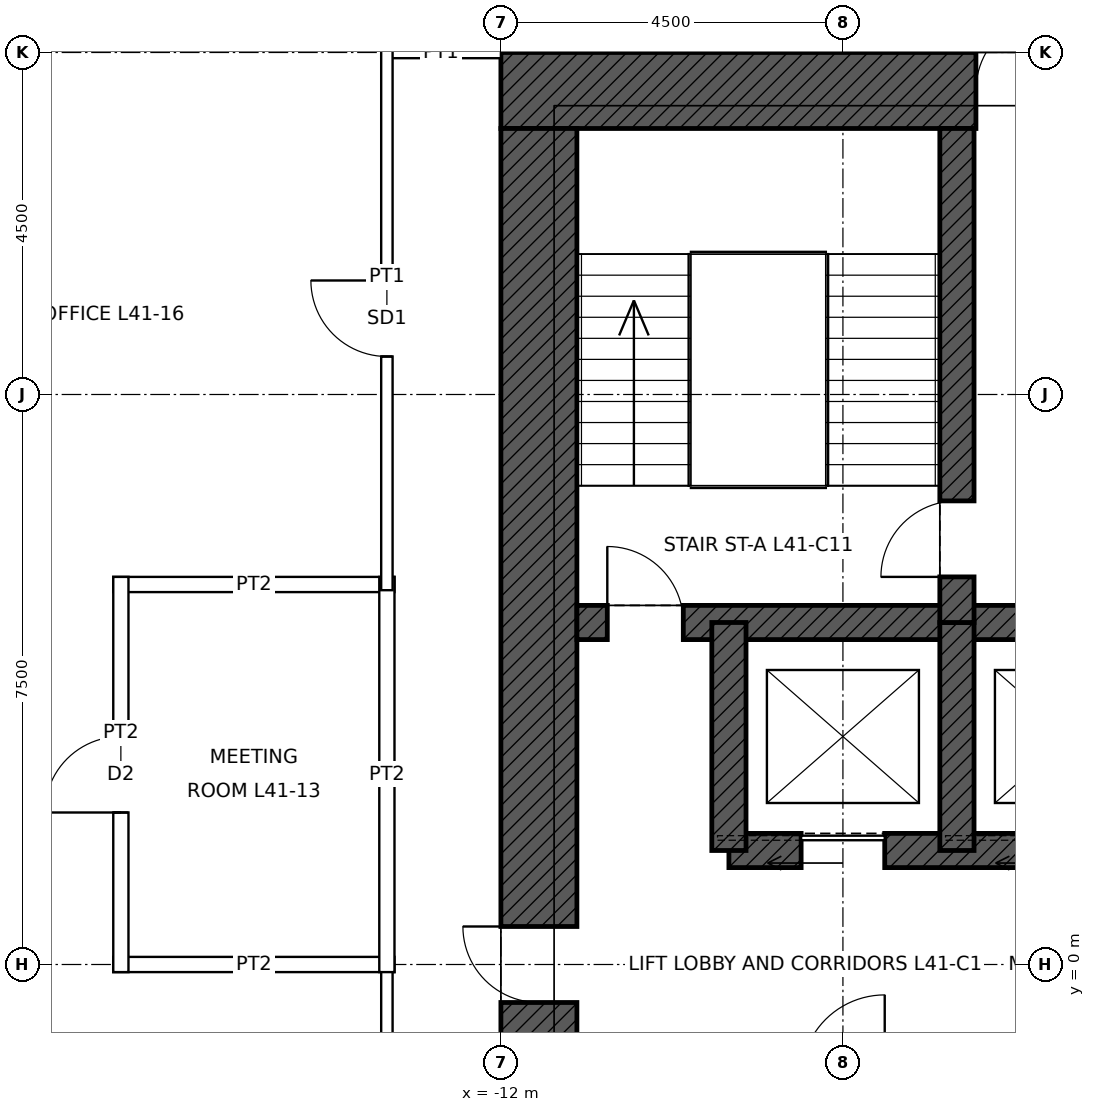
"""IFC4 building model, lengths in metres.
Left out: names, types, materials, properties, quantities, classifications, styles, units other than length and angle.
Written with IfcOpenShell. Run it as: python <this file> out.ifc"""

import sys

from ifc_helpers import new_model, si_unit, direction, frame, frame_2d, origin, place, context, subcontext, project, spatial, rectangle, extrude, element, fill, save


model = new_model("IFC4")
c1 = context("Model", 3, precision=1e-05, world=origin(), true_north=direction((0.0, 1.0)))
c2 = subcontext(c1, "Body", "Model", "MODEL_VIEW")
j1 = project(units=[si_unit("LENGTHUNIT", "METRE"), si_unit("PLANEANGLEUNIT", "RADIAN")], contexts=[c1])
p1 = place(None, origin())
s1 = spatial("IfcSite", under=j1, at=p1, CompositionType="ELEMENT")
p2 = place(p1, origin())
s2 = spatial("IfcBuilding", under=s1, at=p2, CompositionType="ELEMENT")
p3 = place(p2, frame((0.0, 0.0, 197.9)))
s3 = spatial("IfcBuildingStorey", under=s2, at=p3, CompositionType="ELEMENT", Elevation=197.9)
p4 = place(p3, frame((-12.0, 11.5, 0.0), z_axis=(0.0, 0.0, 1.0), x_axis=(1.0, 0.0, 0.0)))
e1 = element("IfcWall", 1, at=p4, inside=s3, PredefinedType="SHEAR", context=c2, shape_type="SweptSolid", body=[
    extrude(rectangle(XDim=24.0, YDim=1.0, at=frame_2d((12.0, 0.0))), origin(), (0.0, 0.0, 1.0), 4.0),
])
p5 = place(p4, frame((6.25, 0.0, 0.0)))
e2 = element("IfcOpeningElement", 2, at=p5, cuts=e1, PredefinedType="OPENING", context=c2, shape_type="SweptSolid", body=[
    extrude(rectangle(XDim=1.0, YDim=2.4, at=frame_2d((0.5, 1.2))), frame((0.0, 0.51, 0.0), z_axis=(0.0, -1.0, 0.0), x_axis=(1.0, 0.0, 0.0)), (0.0, 0.0, 1.0), 1.02),
])
p6 = place(p4, frame((16.75, 0.0, 0.0)))
e3 = element("IfcOpeningElement", 3, at=p6, cuts=e1, PredefinedType="OPENING", context=c2, shape_type="SweptSolid", body=[
    extrude(rectangle(XDim=1.0, YDim=2.4, at=frame_2d((0.5, 1.2))), frame((0.0, 0.51, 0.0), z_axis=(0.0, -1.0, 0.0), x_axis=(1.0, 0.0, 0.0)), (0.0, 0.0, 1.0), 1.02),
])
p7 = place(p3, frame((-11.5, -11.0, 0.0), z_axis=(0.0, 0.0, 1.0), x_axis=(0.0, 1.0, 0.0)))
e4 = element("IfcWall", 4, at=p7, inside=s3, PredefinedType="SHEAR", context=c2, shape_type="SweptSolid", body=[
    extrude(rectangle(XDim=22.0, YDim=1.0, at=frame_2d((11.0, 0.0))), origin(), (0.0, 0.0, 1.0), 4.0),
])
p8 = place(p7, frame((10.5, 0.0, 0.0)))
e5 = element("IfcOpeningElement", 5, at=p8, cuts=e4, PredefinedType="OPENING", context=c2, shape_type="SweptSolid", body=[
    extrude(rectangle(XDim=1.0, YDim=2.4, at=frame_2d((0.5, 1.2))), frame((0.0, 0.51, 0.0), z_axis=(0.0, -1.0, 0.0), x_axis=(1.0, 0.0, 0.0)), (0.0, 0.0, 1.0), 1.02),
])
p9 = place(p3, frame((-11.0, 4.5, 0.0), z_axis=(0.0, 0.0, 1.0), x_axis=(1.0, 0.0, 0.0)))
e6 = element("IfcWall", 6, at=p9, inside=s3, PredefinedType="SHEAR", context=c2, shape_type="SweptSolid", body=[
    extrude(rectangle(XDim=22.0, YDim=0.45, at=frame_2d((11.0, 0.0))), origin(), (0.0, 0.0, 1.0), 4.0),
])
p10 = place(p9, frame((0.4, 0.0, 0.0)))
e7 = element("IfcOpeningElement", 7, at=p10, cuts=e6, PredefinedType="OPENING", context=c2, shape_type="SweptSolid", body=[
    extrude(rectangle(XDim=1.0, YDim=2.1, at=frame_2d((0.5, 1.05))), frame((0.0, 0.235, 0.0), z_axis=(0.0, -1.0, 0.0), x_axis=(1.0, 0.0, 0.0)), (0.0, 0.0, 1.0), 0.47),
])
p11 = place(p9, frame((20.6, 0.0, 0.0)))
e8 = element("IfcOpeningElement", 8, at=p11, cuts=e6, PredefinedType="OPENING", context=c2, shape_type="SweptSolid", body=[
    extrude(rectangle(XDim=1.0, YDim=2.1, at=frame_2d((0.5, 1.05))), frame((0.0, 0.235, 0.0), z_axis=(0.0, -1.0, 0.0), x_axis=(1.0, 0.0, 0.0)), (0.0, 0.0, 1.0), 0.47),
])
p12 = place(p3, frame((-9.0, 1.5, 0.0), z_axis=(0.0, 0.0, 1.0), x_axis=(1.0, 0.0, 0.0)))
e9 = element("IfcWall", 9, at=p12, inside=s3, PredefinedType="SHEAR", context=c2, shape_type="SweptSolid", body=[
    extrude(rectangle(XDim=18.0, YDim=0.45, at=frame_2d((9.0, 0.0))), origin(), (0.0, 0.0, 1.0), 4.0),
])
p13 = place(p12, frame((0.95, 0.0, 0.0)))
e10 = element("IfcOpeningElement", 10, at=p13, cuts=e9, PredefinedType="OPENING", context=c2, shape_type="SweptSolid", body=[
    extrude(rectangle(XDim=1.1, YDim=2.1, at=frame_2d((0.55, 1.05))), frame((0.0, 0.235, 0.0), z_axis=(0.0, -1.0, 0.0), x_axis=(1.0, 0.0, 0.0)), (0.0, 0.0, 1.0), 0.47),
])
p14 = place(p12, frame((3.95, 0.0, 0.0)))
e11 = element("IfcOpeningElement", 11, at=p14, cuts=e9, PredefinedType="OPENING", context=c2, shape_type="SweptSolid", body=[
    extrude(rectangle(XDim=1.1, YDim=2.1, at=frame_2d((0.55, 1.05))), frame((0.0, 0.235, 0.0), z_axis=(0.0, -1.0, 0.0), x_axis=(1.0, 0.0, 0.0)), (0.0, 0.0, 1.0), 0.47),
])
p15 = place(p12, frame((6.95, 0.0, 0.0)))
e12 = element("IfcOpeningElement", 12, at=p15, cuts=e9, PredefinedType="OPENING", context=c2, shape_type="SweptSolid", body=[
    extrude(rectangle(XDim=1.1, YDim=2.1, at=frame_2d((0.55, 1.05))), frame((0.0, 0.235, 0.0), z_axis=(0.0, -1.0, 0.0), x_axis=(1.0, 0.0, 0.0)), (0.0, 0.0, 1.0), 0.47),
])
p16 = place(p12, frame((9.95, 0.0, 0.0)))
e13 = element("IfcOpeningElement", 13, at=p16, cuts=e9, PredefinedType="OPENING", context=c2, shape_type="SweptSolid", body=[
    extrude(rectangle(XDim=1.1, YDim=2.1, at=frame_2d((0.55, 1.05))), frame((0.0, 0.235, 0.0), z_axis=(0.0, -1.0, 0.0), x_axis=(1.0, 0.0, 0.0)), (0.0, 0.0, 1.0), 0.47),
])
p17 = place(p12, frame((12.95, 0.0, 0.0)))
e14 = element("IfcOpeningElement", 14, at=p17, cuts=e9, PredefinedType="OPENING", context=c2, shape_type="SweptSolid", body=[
    extrude(rectangle(XDim=1.1, YDim=2.1, at=frame_2d((0.55, 1.05))), frame((0.0, 0.235, 0.0), z_axis=(0.0, -1.0, 0.0), x_axis=(1.0, 0.0, 0.0)), (0.0, 0.0, 1.0), 0.47),
])
p18 = place(p12, frame((15.95, 0.0, 0.0)))
e15 = element("IfcOpeningElement", 15, at=p18, cuts=e9, PredefinedType="OPENING", context=c2, shape_type="SweptSolid", body=[
    extrude(rectangle(XDim=1.1, YDim=2.1, at=frame_2d((0.55, 1.05))), frame((0.0, 0.235, 0.0), z_axis=(0.0, -1.0, 0.0), x_axis=(1.0, 0.0, 0.0)), (0.0, 0.0, 1.0), 0.47),
])
for number, where, z_axis, x_axis in (
    (16, (-9.0, 1.5, 0.0), (0.0, 0.0, 1.0), (0.0, 1.0, 0.0)),
    (17, (-6.0, 1.5, 0.0), (0.0, 0.0, 1.0), (0.0, 1.0, 0.0)),
):
    element("IfcWall", number, at=place(p3, frame(where, z_axis=z_axis, x_axis=x_axis)), inside=s3, PredefinedType="SHEAR", context=c2, shape_type="SweptSolid", body=[
        extrude(rectangle(XDim=3.0, YDim=0.45, at=frame_2d((1.5, 0.0))), origin(), (0.0, 0.0, 1.0), 4.0),
    ])
p19 = place(p3, frame((-6.0, 4.5, 0.0), z_axis=(0.0, 0.0, 1.0), x_axis=(0.0, 1.0, 0.0)))
e18 = element("IfcWall", 18, at=p19, inside=s3, PredefinedType="SHEAR", context=c2, shape_type="SweptSolid", body=[
    extrude(rectangle(XDim=6.5, YDim=0.45, at=frame_2d((3.25, 0.0))), origin(), (0.0, 0.0, 1.0), 4.0),
])
p20 = place(p19, frame((0.6, 0.0, 0.0)))
e19 = element("IfcOpeningElement", 19, at=p20, cuts=e18, PredefinedType="OPENING", context=c2, shape_type="SweptSolid", body=[
    extrude(rectangle(XDim=1.0, YDim=2.1, at=frame_2d((0.5, 1.05))), frame((0.0, 0.235, 0.0), z_axis=(0.0, -1.0, 0.0), x_axis=(1.0, 0.0, 0.0)), (0.0, 0.0, 1.0), 0.47),
])
p21 = place(p3, frame((-17.1, 0.0, 0.0), z_axis=(0.0, 0.0, 1.0), x_axis=(1.0, 0.0, 0.0)))
e20 = element("IfcWall", 20, at=p21, inside=s3, PredefinedType="PARTITIONING", context=c2, shape_type="SweptSolid", body=[
    extrude(rectangle(XDim=3.7, YDim=0.2, at=frame_2d((1.85, 0.0))), origin(), (0.0, 0.0, 1.0), 3.238),
])
p22 = place(p3, frame((-17.1, 5.0, 0.0), z_axis=(0.0, 0.0, 1.0), x_axis=(1.0, 0.0, 0.0)))
e21 = element("IfcWall", 21, at=p22, inside=s3, PredefinedType="PARTITIONING", context=c2, shape_type="SweptSolid", body=[
    extrude(rectangle(XDim=3.7, YDim=0.2, at=frame_2d((1.85, 0.0))), origin(), (0.0, 0.0, 1.0), 3.85),
])
p23 = place(p3, frame((-13.575, 12.0, 0.0), z_axis=(0.0, 0.0, 1.0), x_axis=(1.0, 0.0, 0.0)))
e22 = element("IfcWall", 22, at=p23, inside=s3, PredefinedType="PARTITIONING", context=c2, shape_type="SweptSolid", body=[
    extrude(rectangle(XDim=1.575, YDim=0.15, at=frame_2d((0.788, 0.0))), origin(), (0.0, 0.0, 1.0), 3.85),
])
p24 = place(p3, frame((-17.0, -0.1, 0.0), z_axis=(0.0, 0.0, 1.0), x_axis=(0.0, 1.0, 0.0)))
e23 = element("IfcWall", 23, at=p24, inside=s3, PredefinedType="PARTITIONING", context=c2, shape_type="SweptSolid", body=[
    extrude(rectangle(XDim=5.2, YDim=0.2, at=frame_2d((2.6, 0.0))), origin(), (0.0, 0.0, 1.0), 3.85),
])
p25 = place(p24, frame((2.1, 0.0, 0.0)))
e24 = element("IfcOpeningElement", 24, at=p25, cuts=e23, PredefinedType="OPENING", context=c2, shape_type="SweptSolid", body=[
    extrude(rectangle(XDim=1.0, YDim=2.1, at=frame_2d((0.5, 1.05))), frame((0.0, 0.11, 0.0), z_axis=(0.0, -1.0, 0.0), x_axis=(1.0, 0.0, 0.0)), (0.0, 0.0, 1.0), 0.22),
])
p26 = place(p3, frame((-13.5, -13.575, 0.0), z_axis=(0.0, 0.0, 1.0), x_axis=(0.0, 1.0, 0.0)))
e25 = element("IfcWall", 25, at=p26, inside=s3, PredefinedType="PARTITIONING", context=c2, shape_type="SweptSolid", body=[
    extrude(rectangle(XDim=13.65, YDim=0.15, at=frame_2d((6.825, 0.0))), origin(), (0.0, 0.0, 1.0), 3.85),
])
p27 = place(p3, frame((-13.5, -0.1, 0.0), z_axis=(0.0, 0.0, 1.0), x_axis=(0.0, 1.0, 0.0)))
e26 = element("IfcWall", 26, at=p27, inside=s3, PredefinedType="PARTITIONING", context=c2, shape_type="SweptSolid", body=[
    extrude(rectangle(XDim=5.2, YDim=0.2, at=frame_2d((2.6, 0.0))), origin(), (0.0, 0.0, 1.0), 3.85),
])
p28 = place(p3, frame((-13.5, 4.925, 0.0), z_axis=(0.0, 0.0, 1.0), x_axis=(0.0, 1.0, 0.0)))
e27 = element("IfcWall", 27, at=p28, inside=s3, PredefinedType="PARTITIONING", context=c2, shape_type="SweptSolid", body=[
    extrude(rectangle(XDim=7.15, YDim=0.15, at=frame_2d((3.575, 0.0))), origin(), (0.0, 0.0, 1.0), 3.85),
])
p29 = place(p28, frame((3.075, 0.0, 0.0)))
e28 = element("IfcOpeningElement", 28, at=p29, cuts=e27, PredefinedType="OPENING", context=c2, shape_type="SweptSolid", body=[
    extrude(rectangle(XDim=1.0, YDim=2.4, at=frame_2d((0.5, 1.2))), frame((0.0, 0.085, 0.0), z_axis=(0.0, -1.0, 0.0), x_axis=(1.0, 0.0, 0.0)), (0.0, 0.0, 1.0), 0.17),
])
p30 = place(p10, origin())
e29 = element("IfcDoor", 29, at=p30, inside=s3, OperationType="SINGLE_SWING_LEFT", PredefinedType="DOOR", context=c2, shape_type="SweptSolid", body=[
    extrude(rectangle(XDim=1.0, YDim=2.1, at=frame_2d((0.5, 1.05))), frame((0.0, 0.025, 0.0), z_axis=(0.0, -1.0, 0.0), x_axis=(1.0, 0.0, 0.0)), (0.0, 0.0, 1.0), 0.05),
])
fill(e7, e29)
p31 = place(p20, origin())
e30 = element("IfcDoor", 30, at=p31, inside=s3, OperationType="SINGLE_SWING_LEFT", PredefinedType="DOOR", context=c2, shape_type="SweptSolid", body=[
    extrude(rectangle(XDim=1.0, YDim=2.1, at=frame_2d((0.5, 1.05))), frame((0.0, 0.025, 0.0), z_axis=(0.0, -1.0, 0.0), x_axis=(1.0, 0.0, 0.0)), (0.0, 0.0, 1.0), 0.05),
])
fill(e19, e30)
p32 = place(p5, origin())
e31 = element("IfcDoor", 31, at=p32, inside=s3, OperationType="SINGLE_SWING_RIGHT", PredefinedType="DOOR", context=c2, shape_type="SweptSolid", body=[
    extrude(rectangle(XDim=1.0, YDim=2.4, at=frame_2d((0.5, 1.2))), frame((0.0, 0.485, 0.0), z_axis=(0.0, -1.0, 0.0), x_axis=(1.0, 0.0, 0.0)), (0.0, 0.0, 1.0), 0.05),
])
fill(e2, e31)
p33 = place(p8, origin())
e32 = element("IfcDoor", 32, at=p33, inside=s3, OperationType="SINGLE_SWING_RIGHT", PredefinedType="DOOR", context=c2, shape_type="SweptSolid", body=[
    extrude(rectangle(XDim=1.0, YDim=2.4, at=frame_2d((0.5, 1.2))), frame((0.0, 0.485, 0.0), z_axis=(0.0, -1.0, 0.0), x_axis=(1.0, 0.0, 0.0)), (0.0, 0.0, 1.0), 0.05),
])
fill(e5, e32)
p34 = place(p13, origin())
e33 = element("IfcDoor", 33, at=p34, inside=s3, OperationType="SLIDING_TO_LEFT", PredefinedType="DOOR", context=c2, shape_type="SweptSolid", body=[
    extrude(rectangle(XDim=1.1, YDim=2.1, at=frame_2d((0.55, 1.05))), frame((0.0, 0.025, 0.0), z_axis=(0.0, -1.0, 0.0), x_axis=(1.0, 0.0, 0.0)), (0.0, 0.0, 1.0), 0.05),
])
fill(e10, e33)
p35 = place(p25, origin())
e34 = element("IfcDoor", 34, at=p35, inside=s3, OperationType="SINGLE_SWING_LEFT", PredefinedType="DOOR", context=c2, shape_type="SweptSolid", body=[
    extrude(rectangle(XDim=1.0, YDim=2.1, at=frame_2d((0.5, 1.05))), frame((0.0, 0.025, 0.0), z_axis=(0.0, -1.0, 0.0), x_axis=(1.0, 0.0, 0.0)), (0.0, 0.0, 1.0), 0.05),
])
fill(e24, e34)
p36 = place(p29, origin())
e35 = element("IfcDoor", 35, at=p36, inside=s3, OperationType="SINGLE_SWING_RIGHT", PredefinedType="DOOR", context=c2, shape_type="SweptSolid", body=[
    extrude(rectangle(XDim=1.0, YDim=2.4, at=frame_2d((0.5, 1.2))), frame((0.0, 0.025, 0.0), z_axis=(0.0, -1.0, 0.0), x_axis=(1.0, 0.0, 0.0)), (0.0, 0.0, 1.0), 0.05),
])
fill(e28, e35)
save(model, sys.argv[1])
